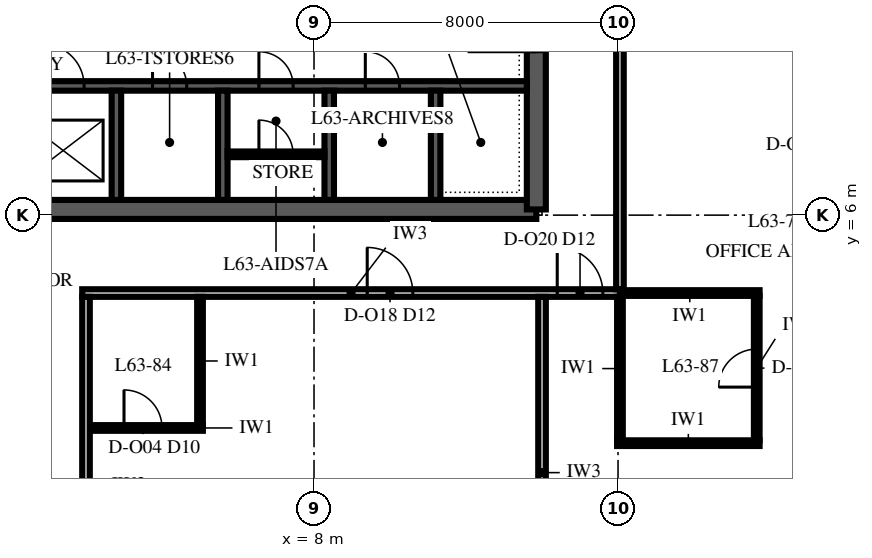
"""IFC4 building model, lengths in metres.
Left out: names, types, materials, properties, quantities, classifications, styles, units other than length and angle.
Written with IfcOpenShell. Run it as: python <this file> out.ifc"""

import sys

from ifc_helpers import new_model, si_unit, direction, frame, frame_2d, origin, place, context, subcontext, project, spatial, polyline, rectangle, outline, extrude, element, fill, save


model = new_model("IFC4")
c1 = context("Model", 3, precision=1e-05, world=origin(), true_north=direction((0.0, 1.0)))
c2 = subcontext(c1, "Body", "Model", "MODEL_VIEW")
j1 = project(units=[si_unit("LENGTHUNIT", "METRE"), si_unit("PLANEANGLEUNIT", "RADIAN")], contexts=[c1])
p1 = place(None, origin())
s1 = spatial("IfcSite", under=j1, at=p1, CompositionType="ELEMENT")
p2 = place(p1, origin())
s2 = spatial("IfcBuilding", under=s1, at=p2, CompositionType="ELEMENT")
p3 = place(p2, frame((0.0, 0.0, 272.0)))
s3 = spatial("IfcBuildingStorey", under=s2, at=p3, CompositionType="ELEMENT", Elevation=272.0)
p4 = place(p3, frame((-13.85, 6.15, 0.0), z_axis=(0.0, 0.0, 1.0), x_axis=(1.0, 0.0, 0.0)))
e1 = element("IfcWall", 1, at=p4, inside=s3, PredefinedType="SHEAR", context=c2, shape_type="SweptSolid", body=[
    extrude(rectangle(XDim=27.7, YDim=0.5, at=frame_2d((13.85, 0.0))), origin(), (0.0, 0.0, 1.0), 4.0),
])
p5 = place(p3, frame((13.85, 6.15, 0.0), z_axis=(0.0, 0.0, 1.0), x_axis=(0.0, 1.0, 0.0)))
e2 = element("IfcWall", 2, at=p5, inside=s3, PredefinedType="SHEAR", context=c2, shape_type="SweptSolid", body=[
    extrude(outline(polyline([(0.0, -0.25), (17.7, -0.25), (17.7, 0.0), (17.45, 0.0), (17.45, 0.25), (0.25, 0.25), (0.25, 0.0), (0.0, 0.0), (0.0, -0.25)])), origin(), (0.0, 0.0, 1.0), 4.0),
])
p6 = place(p5, frame((4.15, 0.0, 0.0)))
e3 = element("IfcOpeningElement", 3, at=p6, cuts=e2, PredefinedType="OPENING", context=c2, shape_type="SweptSolid", body=[
    extrude(rectangle(XDim=1.8, YDim=2.4, at=frame_2d((0.9, 1.2))), frame((0.0, 0.265, 0.0), z_axis=(0.0, -1.0, 0.0), x_axis=(1.0, 0.0, 0.0)), (0.0, 0.0, 1.0), 0.53),
])
p7 = place(p3, frame((-13.6, 9.4, 0.0), z_axis=(0.0, 0.0, 1.0), x_axis=(1.0, 0.0, 0.0)))
e4 = element("IfcWall", 4, at=p7, inside=s3, PredefinedType="SHEAR", context=c2, shape_type="SweptSolid", body=[
    extrude(rectangle(XDim=27.2, YDim=0.25, at=frame_2d((13.6, 0.0))), origin(), (0.0, 0.0, 1.0), 4.0),
])
p8 = place(p7, frame((8.85, 0.0, 0.0)))
e5 = element("IfcOpeningElement", 5, at=p8, cuts=e4, PredefinedType="OPENING", context=c2, shape_type="SweptSolid", body=[
    extrude(rectangle(XDim=1.1, YDim=2.1, at=frame_2d((0.55, 1.05))), frame((0.0, 0.14, 0.0), z_axis=(0.0, -1.0, 0.0), x_axis=(1.0, 0.0, 0.0)), (0.0, 0.0, 1.0), 0.28),
])
p9 = place(p7, frame((11.65, 0.0, 0.0)))
e6 = element("IfcOpeningElement", 6, at=p9, cuts=e4, PredefinedType="OPENING", context=c2, shape_type="SweptSolid", body=[
    extrude(rectangle(XDim=1.1, YDim=2.1, at=frame_2d((0.55, 1.05))), frame((0.0, 0.14, 0.0), z_axis=(0.0, -1.0, 0.0), x_axis=(1.0, 0.0, 0.0)), (0.0, 0.0, 1.0), 0.28),
])
p10 = place(p7, frame((14.45, 0.0, 0.0)))
e7 = element("IfcOpeningElement", 7, at=p10, cuts=e4, PredefinedType="OPENING", context=c2, shape_type="SweptSolid", body=[
    extrude(rectangle(XDim=1.1, YDim=2.1, at=frame_2d((0.55, 1.05))), frame((0.0, 0.14, 0.0), z_axis=(0.0, -1.0, 0.0), x_axis=(1.0, 0.0, 0.0)), (0.0, 0.0, 1.0), 0.28),
])
p11 = place(p7, frame((0.55, 0.0, 0.0)))
e8 = element("IfcOpeningElement", 8, at=p11, cuts=e4, PredefinedType="OPENING", context=c2, shape_type="SweptSolid", body=[
    extrude(rectangle(XDim=0.9, YDim=2.1, at=frame_2d((0.45, 1.05))), frame((0.0, 0.14, 0.0), z_axis=(0.0, -1.0, 0.0), x_axis=(1.0, 0.0, 0.0)), (0.0, 0.0, 1.0), 0.28),
])
p12 = place(p7, frame((3.35, 0.0, 0.0)))
e9 = element("IfcOpeningElement", 9, at=p12, cuts=e4, PredefinedType="OPENING", context=c2, shape_type="SweptSolid", body=[
    extrude(rectangle(XDim=0.9, YDim=2.1, at=frame_2d((0.45, 1.05))), frame((0.0, 0.14, 0.0), z_axis=(0.0, -1.0, 0.0), x_axis=(1.0, 0.0, 0.0)), (0.0, 0.0, 1.0), 0.28),
])
p13 = place(p7, frame((6.15, 0.0, 0.0)))
e10 = element("IfcOpeningElement", 10, at=p13, cuts=e4, PredefinedType="OPENING", context=c2, shape_type="SweptSolid", body=[
    extrude(rectangle(XDim=0.9, YDim=2.1, at=frame_2d((0.45, 1.05))), frame((0.0, 0.14, 0.0), z_axis=(0.0, -1.0, 0.0), x_axis=(1.0, 0.0, 0.0)), (0.0, 0.0, 1.0), 0.28),
])
p14 = place(p7, frame((17.35, 0.0, 0.0)))
e11 = element("IfcOpeningElement", 11, at=p14, cuts=e4, PredefinedType="OPENING", context=c2, shape_type="SweptSolid", body=[
    extrude(rectangle(XDim=0.9, YDim=2.1, at=frame_2d((0.45, 1.05))), frame((0.0, 0.14, 0.0), z_axis=(0.0, -1.0, 0.0), x_axis=(1.0, 0.0, 0.0)), (0.0, 0.0, 1.0), 0.28),
])
p15 = place(p7, frame((20.15, 0.0, 0.0)))
e12 = element("IfcOpeningElement", 12, at=p15, cuts=e4, PredefinedType="OPENING", context=c2, shape_type="SweptSolid", body=[
    extrude(rectangle(XDim=0.9, YDim=2.1, at=frame_2d((0.45, 1.05))), frame((0.0, 0.14, 0.0), z_axis=(0.0, -1.0, 0.0), x_axis=(1.0, 0.0, 0.0)), (0.0, 0.0, 1.0), 0.28),
])
p16 = place(p7, frame((22.95, 0.0, 0.0)))
e13 = element("IfcOpeningElement", 13, at=p16, cuts=e4, PredefinedType="OPENING", context=c2, shape_type="SweptSolid", body=[
    extrude(rectangle(XDim=0.9, YDim=2.1, at=frame_2d((0.45, 1.05))), frame((0.0, 0.14, 0.0), z_axis=(0.0, -1.0, 0.0), x_axis=(1.0, 0.0, 0.0)), (0.0, 0.0, 1.0), 0.28),
])
for number, where, z_axis, x_axis in (
    (14, (2.8, 6.4, 0.0), (0.0, 0.0, 1.0), (0.0, 1.0, 0.0)),
    (15, (5.6, 6.4, 0.0), (0.0, 0.0, 1.0), (0.0, 1.0, 0.0)),
    (16, (8.4, 6.4, 0.0), (0.0, 0.0, 1.0), (0.0, 1.0, 0.0)),
    (17, (11.2, 6.4, 0.0), (0.0, 0.0, 1.0), (0.0, 1.0, 0.0)),
):
    element("IfcWall", number, at=place(p3, frame(where, z_axis=z_axis, x_axis=x_axis)), inside=s3, PredefinedType="SHEAR", context=c2, shape_type="SweptSolid", body=[
        extrude(rectangle(XDim=2.875, YDim=0.25, at=frame_2d((1.438, 0.0))), origin(), (0.0, 0.0, 1.0), 4.0),
    ])
p17 = place(p3, frame((5.725, 7.6, 0.0), z_axis=(0.0, 0.0, 1.0), x_axis=(1.0, 0.0, 0.0)))
e18 = element("IfcWall", 18, at=p17, inside=s3, PredefinedType="PARTITIONING", context=c2, shape_type="SweptSolid", body=[
    extrude(rectangle(XDim=2.55, YDim=0.15, at=frame_2d((1.275, 0.0))), origin(), (0.0, 0.0, 1.0), 3.85),
])
p18 = place(p17, frame((0.825, 0.0, 0.0)))
e19 = element("IfcOpeningElement", 19, at=p18, cuts=e18, PredefinedType="OPENING", context=c2, shape_type="SweptSolid", body=[
    extrude(rectangle(XDim=0.9, YDim=2.1, at=frame_2d((0.45, 1.05))), frame((0.0, 0.09, 0.0), z_axis=(0.0, -1.0, 0.0), x_axis=(1.0, 0.0, 0.0)), (0.0, 0.0, 1.0), 0.18),
])
p19 = place(p3, frame((15.975, 0.0, 0.0), z_axis=(0.0, 0.0, 1.0), x_axis=(1.0, 0.0, 0.0)))
e20 = element("IfcWall", 20, at=p19, inside=s3, PredefinedType="PARTITIONING", context=c2, shape_type="SweptSolid", body=[
    extrude(rectangle(XDim=3.75, YDim=0.15, at=frame_2d((1.875, 0.0))), origin(), (0.0, 0.0, 1.0), 3.23),
])
p20 = place(p3, frame((2.1, 0.4, 0.0), z_axis=(0.0, 0.0, 1.0), x_axis=(1.0, 0.0, 0.0)))
e21 = element("IfcWall", 21, at=p20, inside=s3, PredefinedType="PARTITIONING", context=c2, shape_type="SweptSolid", body=[
    extrude(rectangle(XDim=2.975, YDim=0.15, at=frame_2d((1.487, 0.0))), origin(), (0.0, 0.0, 1.0), 3.23),
])
p21 = place(p20, frame((0.9, 0.0, 0.0)))
e22 = element("IfcOpeningElement", 22, at=p21, cuts=e21, PredefinedType="OPENING", context=c2, shape_type="SweptSolid", body=[
    extrude(rectangle(XDim=1.0, YDim=2.3, at=frame_2d((0.5, 1.15))), frame((0.0, 0.09, 0.0), z_axis=(0.0, -1.0, 0.0), x_axis=(1.0, 0.0, 0.0)), (0.0, 0.0, 1.0), 0.18),
])
p22 = place(p3, frame((1.9, 3.95, 0.0), z_axis=(0.0, 0.0, 1.0), x_axis=(1.0, 0.0, 0.0)))
e23 = element("IfcWall", 23, at=p22, inside=s3, PredefinedType="PARTITIONING", context=c2, shape_type="SweptSolid", body=[
    extrude(rectangle(XDim=14.15, YDim=0.2, at=frame_2d((7.075, 0.0))), origin(), (0.0, 0.0, 1.0), 3.23),
])
p23 = place(p22, frame((7.5, 0.0, 0.0)))
e24 = element("IfcOpeningElement", 24, at=p23, cuts=e23, PredefinedType="OPENING", context=c2, shape_type="SweptSolid", body=[
    extrude(rectangle(XDim=1.2, YDim=2.4, at=frame_2d((0.6, 1.2))), frame((0.0, 0.115, 0.0), z_axis=(0.0, -1.0, 0.0), x_axis=(1.0, 0.0, 0.0)), (0.0, 0.0, 1.0), 0.23),
])
p24 = place(p22, frame((12.5, 0.0, 0.0)))
e25 = element("IfcOpeningElement", 25, at=p24, cuts=e23, PredefinedType="OPENING", context=c2, shape_type="SweptSolid", body=[
    extrude(rectangle(XDim=1.2, YDim=2.4, at=frame_2d((0.6, 1.2))), frame((0.0, 0.115, 0.0), z_axis=(0.0, -1.0, 0.0), x_axis=(1.0, 0.0, 0.0)), (0.0, 0.0, 1.0), 0.23),
])
p25 = place(p3, frame((16.05, 3.95, 0.0), z_axis=(0.0, 0.0, 1.0), x_axis=(1.0, 0.0, 0.0)))
e26 = element("IfcWall", 26, at=p25, inside=s3, PredefinedType="PARTITIONING", context=c2, shape_type="SweptSolid", body=[
    extrude(rectangle(XDim=3.675, YDim=0.15, at=frame_2d((1.837, 0.0))), origin(), (0.0, 0.0, 1.0), 3.23),
])
p26 = place(p3, frame((2.0, -8.325, 0.0), z_axis=(0.0, 0.0, 1.0), x_axis=(0.0, 1.0, 0.0)))
e27 = element("IfcWall", 27, at=p26, inside=s3, PredefinedType="PARTITIONING", context=c2, shape_type="SweptSolid", body=[
    extrude(rectangle(XDim=12.175, YDim=0.2, at=frame_2d((6.087, 0.0))), origin(), (0.0, 0.0, 1.0), 2.842),
])
p27 = place(p3, frame((5.0, 0.475, 0.0), z_axis=(0.0, 0.0, 1.0), x_axis=(0.0, 1.0, 0.0)))
e28 = element("IfcWall", 28, at=p27, inside=s3, PredefinedType="PARTITIONING", context=c2, shape_type="SweptSolid", body=[
    extrude(rectangle(XDim=3.375, YDim=0.15, at=frame_2d((1.688, 0.0))), origin(), (0.0, 0.0, 1.0), 3.85),
])
p28 = place(p3, frame((14.0, -5.4, 0.0), z_axis=(0.0, 0.0, 1.0), x_axis=(0.0, 1.0, 0.0)))
e29 = element("IfcWall", 29, at=p28, inside=s3, PredefinedType="PARTITIONING", context=c2, shape_type="SweptSolid", body=[
    extrude(rectangle(XDim=9.25, YDim=0.2, at=frame_2d((4.625, 0.0))), origin(), (0.0, 0.0, 1.0), 3.23),
])
p29 = place(p3, frame((16.05, 0.075, 0.0), z_axis=(0.0, 0.0, 1.0), x_axis=(0.0, 1.0, 0.0)))
e30 = element("IfcWall", 30, at=p29, inside=s3, PredefinedType="PARTITIONING", context=c2, shape_type="SweptSolid", body=[
    extrude(rectangle(XDim=3.775, YDim=0.15, at=frame_2d((1.888, 0.0))), origin(), (0.0, 0.0, 1.0), 3.85),
])
p30 = place(p3, frame((16.05, 4.05, 0.0), z_axis=(0.0, 0.0, 1.0), x_axis=(0.0, 1.0, 0.0)))
e31 = element("IfcWall", 31, at=p30, inside=s3, PredefinedType="PARTITIONING", context=c2, shape_type="SweptSolid", body=[
    extrude(rectangle(XDim=21.9, YDim=0.2, at=frame_2d((10.95, 0.0))), origin(), (0.0, 0.0, 1.0), 2.842),
])
p31 = place(p30, frame((20.35, 0.0, 0.0)))
e32 = element("IfcOpeningElement", 32, at=p31, cuts=e31, PredefinedType="OPENING", context=c2, shape_type="SweptSolid", body=[
    extrude(rectangle(XDim=1.2, YDim=2.4, at=frame_2d((0.6, 1.2))), frame((0.0, 0.115, 0.0), z_axis=(0.0, -1.0, 0.0), x_axis=(1.0, 0.0, 0.0)), (0.0, 0.0, 1.0), 0.23),
])
p32 = place(p3, frame((19.65, 0.075, 0.0), z_axis=(0.0, 0.0, 1.0), x_axis=(0.0, 1.0, 0.0)))
e33 = element("IfcWall", 33, at=p32, inside=s3, PredefinedType="PARTITIONING", context=c2, shape_type="SweptSolid", body=[
    extrude(rectangle(XDim=3.8, YDim=0.15, at=frame_2d((1.9, 0.0))), origin(), (0.0, 0.0, 1.0), 3.85),
])
p33 = place(p32, frame((1.4, 0.0, 0.0)))
e34 = element("IfcOpeningElement", 34, at=p33, cuts=e33, PredefinedType="OPENING", context=c2, shape_type="SweptSolid", body=[
    extrude(rectangle(XDim=1.0, YDim=2.3, at=frame_2d((0.5, 1.15))), frame((0.0, 0.09, 0.0), z_axis=(0.0, -1.0, 0.0), x_axis=(1.0, 0.0, 0.0)), (0.0, 0.0, 1.0), 0.18),
])
p34 = place(p10, origin())
e35 = element("IfcDoor", 35, at=p34, inside=s3, OperationType="SLIDING_TO_LEFT", PredefinedType="DOOR", context=c2, shape_type="SweptSolid", body=[
    extrude(rectangle(XDim=1.1, YDim=2.1, at=frame_2d((0.55, 1.05))), frame((0.0, 0.125, 0.0), z_axis=(0.0, -1.0, 0.0), x_axis=(1.0, 0.0, 0.0)), (0.0, 0.0, 1.0), 0.25),
])
fill(e7, e35)
p35 = place(p14, origin())
e36 = element("IfcDoor", 36, at=p35, inside=s3, OperationType="SINGLE_SWING_LEFT", PredefinedType="DOOR", context=c2, shape_type="SweptSolid", body=[
    extrude(rectangle(XDim=0.9, YDim=2.1, at=frame_2d((0.45, 1.05))), frame((0.0, 0.125, 0.0), z_axis=(0.0, -1.0, 0.0), x_axis=(1.0, 0.0, 0.0)), (0.0, 0.0, 1.0), 0.25),
])
fill(e11, e36)
p36 = place(p15, origin())
e37 = element("IfcDoor", 37, at=p36, inside=s3, OperationType="SINGLE_SWING_LEFT", PredefinedType="DOOR", context=c2, shape_type="SweptSolid", body=[
    extrude(rectangle(XDim=0.9, YDim=2.1, at=frame_2d((0.45, 1.05))), frame((0.0, 0.125, 0.0), z_axis=(0.0, -1.0, 0.0), x_axis=(1.0, 0.0, 0.0)), (0.0, 0.0, 1.0), 0.25),
])
fill(e12, e37)
p37 = place(p18, origin())
e38 = element("IfcDoor", 38, at=p37, inside=s3, OperationType="SINGLE_SWING_LEFT", PredefinedType="DOOR", context=c2, shape_type="SweptSolid", body=[
    extrude(rectangle(XDim=0.9, YDim=2.1, at=frame_2d((0.45, 1.05))), frame((0.0, 0.075, 0.0), z_axis=(0.0, -1.0, 0.0), x_axis=(1.0, 0.0, 0.0)), (0.0, 0.0, 1.0), 0.149),
])
fill(e19, e38)
p38 = place(p16, origin())
e39 = element("IfcDoor", 39, at=p38, inside=s3, OperationType="SINGLE_SWING_LEFT", PredefinedType="DOOR", context=c2, shape_type="SweptSolid", body=[
    extrude(rectangle(XDim=0.9, YDim=2.1, at=frame_2d((0.45, 1.05))), frame((0.0, 0.125, 0.0), z_axis=(0.0, -1.0, 0.0), x_axis=(1.0, 0.0, 0.0)), (0.0, 0.0, 1.0), 0.25),
])
fill(e13, e39)
p39 = place(p21, origin())
e40 = element("IfcDoor", 40, at=p39, inside=s3, OperationType="SINGLE_SWING_LEFT", PredefinedType="DOOR", context=c2, shape_type="SweptSolid", body=[
    extrude(rectangle(XDim=1.0, YDim=2.3, at=frame_2d((0.5, 1.15))), frame((0.0, 0.075, 0.0), z_axis=(0.0, -1.0, 0.0), x_axis=(1.0, 0.0, 0.0)), (0.0, 0.0, 1.0), 0.149),
])
fill(e22, e40)
p40 = place(p33, origin())
e41 = element("IfcDoor", 41, at=p40, inside=s3, OperationType="SINGLE_SWING_LEFT", PredefinedType="DOOR", context=c2, shape_type="SweptSolid", body=[
    extrude(rectangle(XDim=1.0, YDim=2.3, at=frame_2d((0.5, 1.15))), frame((0.0, 0.075, 0.0), z_axis=(0.0, -1.0, 0.0), x_axis=(1.0, 0.0, 0.0)), (0.0, 0.0, 1.0), 0.149),
])
fill(e34, e41)
p41 = place(p23, origin())
e42 = element("IfcDoor", 42, at=p41, inside=s3, OperationType="SINGLE_SWING_LEFT", PredefinedType="DOOR", context=c2, shape_type="SweptSolid", body=[
    extrude(rectangle(XDim=1.2, YDim=2.4, at=frame_2d((0.6, 1.2))), frame((0.0, 0.1, 0.0), z_axis=(0.0, -1.0, 0.0), x_axis=(1.0, 0.0, 0.0)), (0.0, 0.0, 1.0), 0.199),
])
fill(e24, e42)
p42 = place(p24, origin())
e43 = element("IfcDoor", 43, at=p42, inside=s3, OperationType="SINGLE_SWING_LEFT", PredefinedType="DOOR", context=c2, shape_type="SweptSolid", body=[
    extrude(rectangle(XDim=1.2, YDim=2.4, at=frame_2d((0.6, 1.2))), frame((0.0, 0.1, 0.0), z_axis=(0.0, -1.0, 0.0), x_axis=(1.0, 0.0, 0.0)), (0.0, 0.0, 1.0), 0.199),
])
fill(e25, e43)
save(model, sys.argv[1])
